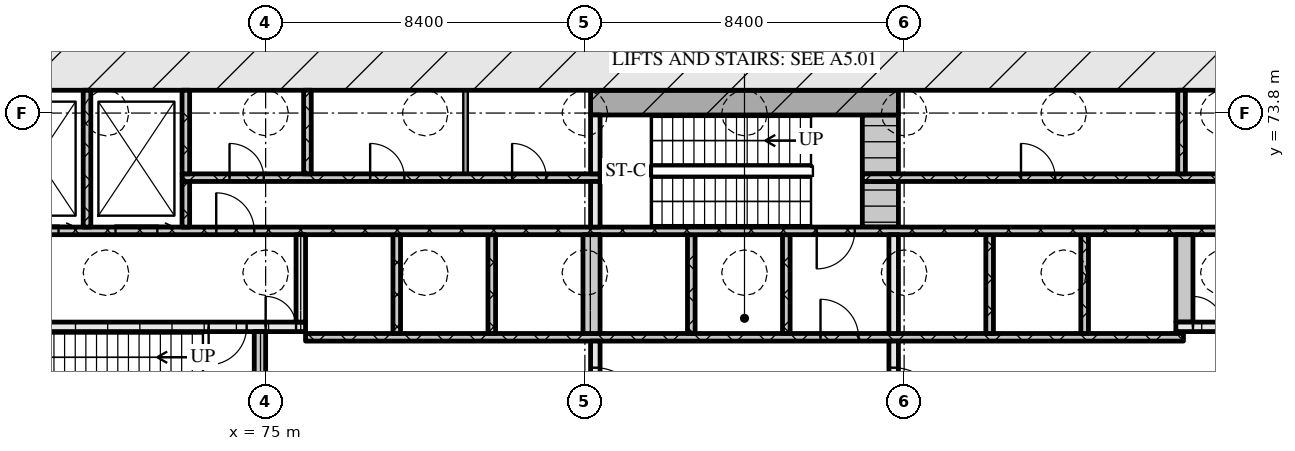
"""IFC4 building model, lengths in metres.
Left out: names, types, materials, properties, quantities, classifications, styles, units other than length and angle.
Written with IfcOpenShell. Run it as: python <this file> out.ifc"""

import sys

from ifc_helpers import new_model, si_unit, direction, frame, frame_2d, origin, place, context, subcontext, project, spatial, rectangle, extrude, element, fill, save


model = new_model("IFC4")
c1 = context("Model", 3, precision=1e-05, world=origin(), true_north=direction((0.0, 1.0)))
c2 = subcontext(c1, "Body", "Model", "MODEL_VIEW")
j1 = project(units=[si_unit("LENGTHUNIT", "METRE"), si_unit("PLANEANGLEUNIT", "RADIAN")], contexts=[c1])
p1 = place(None, origin())
s1 = spatial("IfcSite", under=j1, at=p1, CompositionType="ELEMENT")
p2 = place(p1, origin())
s2 = spatial("IfcBuilding", under=s1, at=p2, CompositionType="ELEMENT")
p3 = place(p2, frame((0.0, 0.0, -6.0)))
s3 = spatial("IfcBuildingStorey", under=s2, at=p3, CompositionType="ELEMENT", Elevation=-6.0)
p4 = place(p3, frame((66.6, 75.0, 0.0), z_axis=(0.0, 0.0, 1.0), x_axis=(1.0, 0.0, 0.0)))
e1 = element("IfcWall", 1, at=p4, inside=s3, PredefinedType="SOLIDWALL", context=c2, shape_type="SweptSolid", body=[
    extrude(rectangle(XDim=42.0, YDim=1.2, at=frame_2d((21.0, 0.0))), origin(), (0.0, 0.0, 1.0), 5.7),
])
p5 = place(p3, frame((74.85, 65.2, 0.0), z_axis=(0.0, 0.0, 1.0), x_axis=(0.0, 1.0, 0.0)))
e2 = element("IfcWall", 2, at=p5, inside=s3, PredefinedType="SOLIDWALL", context=c2, shape_type="SweptSolid", body=[
    extrude(rectangle(XDim=2.85, YDim=0.3, at=frame_2d((1.425, 0.0))), origin(), (0.0, 0.0, 1.0), 5.7),
])
p6 = place(p3, frame((83.675, 65.2, 0.0), z_axis=(0.0, 0.0, 1.0), x_axis=(0.0, 1.0, 0.0)))
e3 = element("IfcWall", 3, at=p6, inside=s3, PredefinedType="SOLIDWALL", context=c2, shape_type="SweptSolid", body=[
    extrude(rectangle(XDim=2.6, YDim=0.25, at=frame_2d((1.3, 0.0))), origin(), (0.0, 0.0, 1.0), 5.7),
])
p7 = place(p6, frame((0.7, 0.0, 0.0)))
e4 = element("IfcOpeningElement", 4, at=p7, cuts=e3, PredefinedType="OPENING", context=c2, shape_type="SweptSolid", body=[
    extrude(rectangle(XDim=1.2, YDim=2.1, at=frame_2d((0.6, 1.05))), frame((0.0, 0.135, 0.0), z_axis=(0.0, -1.0, 0.0), x_axis=(1.0, 0.0, 0.0)), (0.0, 0.0, 1.0), 0.27),
])
p8 = place(p3, frame((91.525, 65.2, 0.0), z_axis=(0.0, 0.0, 1.0), x_axis=(0.0, 1.0, 0.0)))
e5 = element("IfcWall", 5, at=p8, inside=s3, PredefinedType="SOLIDWALL", context=c2, shape_type="SweptSolid", body=[
    extrude(rectangle(XDim=2.6, YDim=0.25, at=frame_2d((1.3, 0.0))), origin(), (0.0, 0.0, 1.0), 5.7),
])
p9 = place(p8, frame((0.7, 0.0, 0.0)))
e6 = element("IfcOpeningElement", 6, at=p9, cuts=e5, PredefinedType="OPENING", context=c2, shape_type="SweptSolid", body=[
    extrude(rectangle(XDim=1.2, YDim=2.1, at=frame_2d((0.6, 1.05))), frame((0.0, 0.135, 0.0), z_axis=(0.0, -1.0, 0.0), x_axis=(1.0, 0.0, 0.0)), (0.0, 0.0, 1.0), 0.27),
])
p10 = place(p3, frame((76.05, 67.9, 0.0), z_axis=(0.0, 0.0, 1.0), x_axis=(1.0, 0.0, 0.0)))
e7 = element("IfcWall", 7, at=p10, inside=s3, PredefinedType="SOLIDWALL", context=c2, shape_type="SweptSolid", body=[
    extrude(rectangle(XDim=23.1, YDim=0.2, at=frame_2d((11.55, 0.0))), origin(), (0.0, 0.0, 1.0), 5.7),
])
p11 = place(p10, frame((13.55, 0.0, 0.0)))
e8 = element("IfcOpeningElement", 8, at=p11, cuts=e7, PredefinedType="OPENING", context=c2, shape_type="SweptSolid", body=[
    extrude(rectangle(XDim=1.0, YDim=2.1, at=frame_2d((0.5, 1.05))), frame((0.0, 0.11, 0.0), z_axis=(0.0, -1.0, 0.0), x_axis=(1.0, 0.0, 0.0)), (0.0, 0.0, 1.0), 0.22),
])
for number, where, z_axis, x_axis in (
    (9, (78.45, 68.0, 0.0), (0.0, 0.0, 1.0), (0.0, 1.0, 0.0)),
    (10, (80.95, 68.0, 0.0), (0.0, 0.0, 1.0), (0.0, 1.0, 0.0)),
):
    element("IfcWall", number, at=place(p3, frame(where, z_axis=z_axis, x_axis=x_axis)), inside=s3, PredefinedType="SOLIDWALL", context=c2, shape_type="SweptSolid", body=[
        extrude(rectangle(XDim=2.6, YDim=0.2, at=frame_2d((1.3, 0.0))), origin(), (0.0, 0.0, 1.0), 5.7),
    ])
p12 = place(p3, frame((83.575, 68.0, 0.0), z_axis=(0.0, 0.0, 1.0), x_axis=(0.0, 1.0, 0.0)))
e11 = element("IfcWall", 11, at=p12, inside=s3, PredefinedType="SOLIDWALL", context=c2, shape_type="SweptSolid", body=[
    extrude(rectangle(XDim=2.6, YDim=0.45, at=frame_2d((1.3, 0.0))), origin(), (0.0, 0.0, 1.0), 5.7),
])
for number, where, z_axis, x_axis in (
    (12, (86.2, 68.0, 0.0), (0.0, 0.0, 1.0), (0.0, 1.0, 0.0)),
    (13, (88.7, 68.0, 0.0), (0.0, 0.0, 1.0), (0.0, 1.0, 0.0)),
):
    element("IfcWall", number, at=place(p3, frame(where, z_axis=z_axis, x_axis=x_axis)), inside=s3, PredefinedType="SOLIDWALL", context=c2, shape_type="SweptSolid", body=[
        extrude(rectangle(XDim=2.6, YDim=0.2, at=frame_2d((1.3, 0.0))), origin(), (0.0, 0.0, 1.0), 5.7),
    ])
p13 = place(p3, frame((91.525, 68.0, 0.0), z_axis=(0.0, 0.0, 1.0), x_axis=(0.0, 1.0, 0.0)))
e14 = element("IfcWall", 14, at=p13, inside=s3, PredefinedType="SOLIDWALL", context=c2, shape_type="SweptSolid", body=[
    extrude(rectangle(XDim=2.6, YDim=0.25, at=frame_2d((1.3, 0.0))), origin(), (0.0, 0.0, 1.0), 5.7),
])
for number, where, z_axis, x_axis in (
    (15, (94.05, 68.0, 0.0), (0.0, 0.0, 1.0), (0.0, 1.0, 0.0)),
    (16, (96.55, 68.0, 0.0), (0.0, 0.0, 1.0), (0.0, 1.0, 0.0)),
):
    element("IfcWall", number, at=place(p3, frame(where, z_axis=z_axis, x_axis=x_axis)), inside=s3, PredefinedType="SOLIDWALL", context=c2, shape_type="SweptSolid", body=[
        extrude(rectangle(XDim=2.6, YDim=0.2, at=frame_2d((1.3, 0.0))), origin(), (0.0, 0.0, 1.0), 5.7),
    ])
p14 = place(p3, frame((98.95, 68.025, 0.0), z_axis=(0.0, 0.0, 1.0), x_axis=(1.0, 0.0, 0.0)))
e17 = element("IfcWall", 17, at=p14, inside=s3, PredefinedType="SOLIDWALL", context=c2, shape_type="SweptSolid", body=[
    extrude(rectangle(XDim=0.2, YDim=0.05, at=frame_2d((0.1, 0.0))), origin(), (0.0, 0.0, 1.0), 5.7),
])
p15 = place(p3, frame((67.8, 68.175, 0.0), z_axis=(0.0, 0.0, 1.0), x_axis=(1.0, 0.0, 0.0)))
e18 = element("IfcWall", 18, at=p15, inside=s3, PredefinedType="SOLIDWALL", context=c2, shape_type="SweptSolid", body=[
    extrude(rectangle(XDim=8.25, YDim=0.25, at=frame_2d((4.125, 0.0))), origin(), (0.0, 0.0, 1.0), 5.7),
])
p16 = place(p15, frame((5.7, 0.0, 0.0)))
e19 = element("IfcOpeningElement", 19, at=p16, cuts=e18, PredefinedType="OPENING", context=c2, shape_type="SweptSolid", body=[
    extrude(rectangle(XDim=1.0, YDim=2.1, at=frame_2d((0.5, 1.05))), frame((0.0, 0.135, 0.0), z_axis=(0.0, -1.0, 0.0), x_axis=(1.0, 0.0, 0.0)), (0.0, 0.0, 1.0), 0.27),
])
p17 = place(p15, frame((7.2, 0.0, 0.0)))
e20 = element("IfcOpeningElement", 20, at=p17, cuts=e18, PredefinedType="OPENING", context=c2, shape_type="SweptSolid", body=[
    extrude(rectangle(XDim=0.8, YDim=2.1, at=frame_2d((0.4, 1.05))), frame((0.0, 0.135, 0.0), z_axis=(0.0, -1.0, 0.0), x_axis=(1.0, 0.0, 0.0)), (0.0, 0.0, 1.0), 0.27),
])
p18 = place(p3, frame((98.95, 68.175, 0.0), z_axis=(0.0, 0.0, 1.0), x_axis=(1.0, 0.0, 0.0)))
e21 = element("IfcWall", 21, at=p18, inside=s3, PredefinedType="SOLIDWALL", context=c2, shape_type="SweptSolid", body=[
    extrude(rectangle(XDim=8.45, YDim=0.25, at=frame_2d((4.225, 0.0))), origin(), (0.0, 0.0, 1.0), 5.7),
])
p19 = place(p18, frame((0.45, 0.0, 0.0)))
e22 = element("IfcOpeningElement", 22, at=p19, cuts=e21, PredefinedType="OPENING", context=c2, shape_type="SweptSolid", body=[
    extrude(rectangle(XDim=0.8, YDim=2.1, at=frame_2d((0.4, 1.05))), frame((0.0, 0.135, 0.0), z_axis=(0.0, -1.0, 0.0), x_axis=(1.0, 0.0, 0.0)), (0.0, 0.0, 1.0), 0.27),
])
p20 = place(p18, frame((1.75, 0.0, 0.0)))
e23 = element("IfcOpeningElement", 23, at=p20, cuts=e21, PredefinedType="OPENING", context=c2, shape_type="SweptSolid", body=[
    extrude(rectangle(XDim=1.0, YDim=2.1, at=frame_2d((0.5, 1.05))), frame((0.0, 0.135, 0.0), z_axis=(0.0, -1.0, 0.0), x_axis=(1.0, 0.0, 0.0)), (0.0, 0.0, 1.0), 0.27),
])
p21 = place(p3, frame((75.925, 68.3, 0.0), z_axis=(0.0, 0.0, 1.0), x_axis=(0.0, 1.0, 0.0)))
e24 = element("IfcWall", 24, at=p21, inside=s3, PredefinedType="SOLIDWALL", context=c2, shape_type="SweptSolid", body=[
    extrude(rectangle(XDim=2.3, YDim=0.25, at=frame_2d((1.15, 0.0))), origin(), (0.0, 0.0, 1.0), 5.7),
])
p22 = place(p3, frame((99.175, 68.3, 0.0), z_axis=(0.0, 0.0, 1.0), x_axis=(0.0, 1.0, 0.0)))
e25 = element("IfcWall", 25, at=p22, inside=s3, PredefinedType="SOLIDWALL", context=c2, shape_type="SweptSolid", body=[
    extrude(rectangle(XDim=2.3, YDim=0.45, at=frame_2d((1.15, 0.0))), origin(), (0.0, 0.0, 1.0), 5.7),
])
p23 = place(p3, frame((67.8, 70.7, 0.0), z_axis=(0.0, 0.0, 1.0), x_axis=(1.0, 0.0, 0.0)))
e26 = element("IfcWall", 26, at=p23, inside=s3, PredefinedType="SOLIDWALL", context=c2, shape_type="SweptSolid", body=[
    extrude(rectangle(XDim=39.6, YDim=0.2, at=frame_2d((19.8, 0.0))), origin(), (0.0, 0.0, 1.0), 5.7),
])
p24 = place(p23, frame((0.65, 0.0, 0.0)))
e27 = element("IfcOpeningElement", 27, at=p24, cuts=e26, PredefinedType="OPENING", context=c2, shape_type="SweptSolid", body=[
    extrude(rectangle(XDim=1.1, YDim=2.1, at=frame_2d((0.55, 1.05))), frame((0.0, 0.11, 0.0), z_axis=(0.0, -1.0, 0.0), x_axis=(1.0, 0.0, 0.0)), (0.0, 0.0, 1.0), 0.22),
])
p25 = place(p23, frame((3.25, 0.0, 0.0)))
e28 = element("IfcOpeningElement", 28, at=p25, cuts=e26, PredefinedType="OPENING", context=c2, shape_type="SweptSolid", body=[
    extrude(rectangle(XDim=1.1, YDim=2.1, at=frame_2d((0.55, 1.05))), frame((0.0, 0.11, 0.0), z_axis=(0.0, -1.0, 0.0), x_axis=(1.0, 0.0, 0.0)), (0.0, 0.0, 1.0), 0.22),
])
p26 = place(p23, frame((5.9, 0.0, 0.0)))
e29 = element("IfcOpeningElement", 29, at=p26, cuts=e26, PredefinedType="OPENING", context=c2, shape_type="SweptSolid", body=[
    extrude(rectangle(XDim=1.0, YDim=2.1, at=frame_2d((0.5, 1.05))), frame((0.0, 0.11, 0.0), z_axis=(0.0, -1.0, 0.0), x_axis=(1.0, 0.0, 0.0)), (0.0, 0.0, 1.0), 0.22),
])
p27 = place(p23, frame((21.7, 0.0, 0.0)))
e30 = element("IfcOpeningElement", 30, at=p27, cuts=e26, PredefinedType="OPENING", context=c2, shape_type="SweptSolid", body=[
    extrude(rectangle(XDim=1.0, YDim=2.1, at=frame_2d((0.5, 1.05))), frame((0.0, 0.11, 0.0), z_axis=(0.0, -1.0, 0.0), x_axis=(1.0, 0.0, 0.0)), (0.0, 0.0, 1.0), 0.22),
])
p28 = place(p23, frame((32.7, 0.0, 0.0)))
e31 = element("IfcOpeningElement", 31, at=p28, cuts=e26, PredefinedType="OPENING", context=c2, shape_type="SweptSolid", body=[
    extrude(rectangle(XDim=1.0, YDim=2.1, at=frame_2d((0.5, 1.05))), frame((0.0, 0.11, 0.0), z_axis=(0.0, -1.0, 0.0), x_axis=(1.0, 0.0, 0.0)), (0.0, 0.0, 1.0), 0.22),
])
p29 = place(p23, frame((35.25, 0.0, 0.0)))
e32 = element("IfcOpeningElement", 32, at=p29, cuts=e26, PredefinedType="OPENING", context=c2, shape_type="SweptSolid", body=[
    extrude(rectangle(XDim=1.1, YDim=2.1, at=frame_2d((0.55, 1.05))), frame((0.0, 0.11, 0.0), z_axis=(0.0, -1.0, 0.0), x_axis=(1.0, 0.0, 0.0)), (0.0, 0.0, 1.0), 0.22),
])
p30 = place(p23, frame((37.85, 0.0, 0.0)))
e33 = element("IfcOpeningElement", 33, at=p30, cuts=e26, PredefinedType="OPENING", context=c2, shape_type="SweptSolid", body=[
    extrude(rectangle(XDim=1.1, YDim=2.1, at=frame_2d((0.55, 1.05))), frame((0.0, 0.11, 0.0), z_axis=(0.0, -1.0, 0.0), x_axis=(1.0, 0.0, 0.0)), (0.0, 0.0, 1.0), 0.22),
])
p31 = place(p3, frame((70.3, 70.8, 0.0), z_axis=(0.0, 0.0, 1.0), x_axis=(0.0, 1.0, 0.0)))
e34 = element("IfcWall", 34, at=p31, inside=s3, PredefinedType="SOLIDWALL", context=c2, shape_type="SweptSolid", body=[
    extrude(rectangle(XDim=3.6, YDim=0.2, at=frame_2d((1.8, 0.0))), origin(), (0.0, 0.0, 1.0), 5.7),
])
p32 = place(p3, frame((72.9, 70.8, 0.0), z_axis=(0.0, 0.0, 1.0), x_axis=(0.0, 1.0, 0.0)))
e35 = element("IfcWall", 35, at=p32, inside=s3, PredefinedType="SOLIDWALL", context=c2, shape_type="SweptSolid", body=[
    extrude(rectangle(XDim=1.2, YDim=0.2, at=frame_2d((0.6, 0.0))), origin(), (0.0, 0.0, 1.0), 5.7),
])
p33 = place(p3, frame((83.675, 70.8, 0.0), z_axis=(0.0, 0.0, 1.0), x_axis=(0.0, 1.0, 0.0)))
e36 = element("IfcWall", 36, at=p33, inside=s3, PredefinedType="SOLIDWALL", context=c2, shape_type="SweptSolid", body=[
    extrude(rectangle(XDim=1.2, YDim=0.25, at=frame_2d((0.6, 0.0))), origin(), (0.0, 0.0, 1.0), 5.7),
])
p34 = place(p3, frame((91.175, 70.8, 0.0), z_axis=(0.0, 0.0, 1.0), x_axis=(0.0, 1.0, 0.0)))
e37 = element("IfcWall", 37, at=p34, inside=s3, PredefinedType="SOLIDWALL", context=c2, shape_type="SweptSolid", body=[
    extrude(rectangle(XDim=1.2, YDim=0.95, at=frame_2d((0.6, 0.0))), origin(), (0.0, 0.0, 1.0), 5.7),
])
p35 = place(p3, frame((72.8, 72.1, 0.0), z_axis=(0.0, 0.0, 1.0), x_axis=(1.0, 0.0, 0.0)))
e38 = element("IfcWall", 38, at=p35, inside=s3, PredefinedType="SOLIDWALL", context=c2, shape_type="SweptSolid", body=[
    extrude(rectangle(XDim=11.0, YDim=0.2, at=frame_2d((5.5, 0.0))), origin(), (0.0, 0.0, 1.0), 5.7),
])
p36 = place(p35, frame((1.25, 0.0, 0.0)))
e39 = element("IfcOpeningElement", 39, at=p36, cuts=e38, PredefinedType="OPENING", context=c2, shape_type="SweptSolid", body=[
    extrude(rectangle(XDim=0.9, YDim=2.1, at=frame_2d((0.45, 1.05))), frame((0.0, 0.11, 0.0), z_axis=(0.0, -1.0, 0.0), x_axis=(1.0, 0.0, 0.0)), (0.0, 0.0, 1.0), 0.22),
])
p37 = place(p35, frame((4.95, 0.0, 0.0)))
e40 = element("IfcOpeningElement", 40, at=p37, cuts=e38, PredefinedType="OPENING", context=c2, shape_type="SweptSolid", body=[
    extrude(rectangle(XDim=0.9, YDim=2.1, at=frame_2d((0.45, 1.05))), frame((0.0, 0.11, 0.0), z_axis=(0.0, -1.0, 0.0), x_axis=(1.0, 0.0, 0.0)), (0.0, 0.0, 1.0), 0.22),
])
p38 = place(p35, frame((8.685, 0.0, 0.0)))
e41 = element("IfcOpeningElement", 41, at=p38, cuts=e38, PredefinedType="OPENING", context=c2, shape_type="SweptSolid", body=[
    extrude(rectangle(XDim=0.9, YDim=2.1, at=frame_2d((0.45, 1.05))), frame((0.0, 0.11, 0.0), z_axis=(0.0, -1.0, 0.0), x_axis=(1.0, 0.0, 0.0)), (0.0, 0.0, 1.0), 0.22),
])
p39 = place(p3, frame((90.7, 72.1, 0.0), z_axis=(0.0, 0.0, 1.0), x_axis=(1.0, 0.0, 0.0)))
e42 = element("IfcWall", 42, at=p39, inside=s3, PredefinedType="SOLIDWALL", context=c2, shape_type="SweptSolid", body=[
    extrude(rectangle(XDim=11.7, YDim=0.2, at=frame_2d((5.85, 0.0))), origin(), (0.0, 0.0, 1.0), 5.7),
])
p40 = place(p39, frame((4.175, 0.0, 0.0)))
e43 = element("IfcOpeningElement", 43, at=p40, cuts=e42, PredefinedType="OPENING", context=c2, shape_type="SweptSolid", body=[
    extrude(rectangle(XDim=0.9, YDim=2.1, at=frame_2d((0.45, 1.05))), frame((0.0, 0.11, 0.0), z_axis=(0.0, -1.0, 0.0), x_axis=(1.0, 0.0, 0.0)), (0.0, 0.0, 1.0), 0.22),
])
p41 = place(p39, frame((9.55, 0.0, 0.0)))
e44 = element("IfcOpeningElement", 44, at=p41, cuts=e42, PredefinedType="OPENING", context=c2, shape_type="SweptSolid", body=[
    extrude(rectangle(XDim=0.9, YDim=2.1, at=frame_2d((0.45, 1.05))), frame((0.0, 0.11, 0.0), z_axis=(0.0, -1.0, 0.0), x_axis=(1.0, 0.0, 0.0)), (0.0, 0.0, 1.0), 0.22),
])
for number, where, z_axis, x_axis in (
    (45, (72.9, 72.2, 0.0), (0.0, 0.0, 1.0), (0.0, 1.0, 0.0)),
    (46, (76.1, 72.2, 0.0), (0.0, 0.0, 1.0), (0.0, 1.0, 0.0)),
):
    element("IfcWall", number, at=place(p3, frame(where, z_axis=z_axis, x_axis=x_axis)), inside=s3, PredefinedType="SOLIDWALL", context=c2, shape_type="SweptSolid", body=[
        extrude(rectangle(XDim=2.2, YDim=0.2, at=frame_2d((1.1, 0.0))), origin(), (0.0, 0.0, 1.0), 5.7),
    ])
p42 = place(p3, frame((80.26, 72.2, 0.0), z_axis=(0.0, 0.0, 1.0), x_axis=(0.0, 1.0, 0.0)))
e47 = element("IfcWall", 47, at=p42, inside=s3, PredefinedType="PARTITIONING", context=c2, shape_type="SweptSolid", body=[
    extrude(rectangle(XDim=2.2, YDim=0.12, at=frame_2d((1.1, 0.0))), origin(), (0.0, 0.0, 1.0), 5.7),
])
p43 = place(p3, frame((83.675, 72.2, 0.0), z_axis=(0.0, 0.0, 1.0), x_axis=(0.0, 1.0, 0.0)))
e48 = element("IfcWall", 48, at=p43, inside=s3, PredefinedType="SOLIDWALL", context=c2, shape_type="SweptSolid", body=[
    extrude(rectangle(XDim=1.55, YDim=0.25, at=frame_2d((0.775, 0.0))), origin(), (0.0, 0.0, 1.0), 5.7),
])
p44 = place(p3, frame((91.175, 72.2, 0.0), z_axis=(0.0, 0.0, 1.0), x_axis=(0.0, 1.0, 0.0)))
e49 = element("IfcWall", 49, at=p44, inside=s3, PredefinedType="SOLIDWALL", context=c2, shape_type="SweptSolid", body=[
    extrude(rectangle(XDim=1.55, YDim=0.95, at=frame_2d((0.775, 0.0))), origin(), (0.0, 0.0, 1.0), 5.7),
])
p45 = place(p3, frame((99.1, 72.2, 0.0), z_axis=(0.0, 0.0, 1.0), x_axis=(0.0, 1.0, 0.0)))
e50 = element("IfcWall", 50, at=p45, inside=s3, PredefinedType="SOLIDWALL", context=c2, shape_type="SweptSolid", body=[
    extrude(rectangle(XDim=2.2, YDim=0.2, at=frame_2d((1.1, 0.0))), origin(), (0.0, 0.0, 1.0), 5.7),
])
p46 = place(p3, frame((83.55, 74.075, 0.0), z_axis=(0.0, 0.0, 1.0), x_axis=(1.0, 0.0, 0.0)))
e51 = element("IfcWall", 51, at=p46, inside=s3, PredefinedType="SOLIDWALL", context=c2, shape_type="SweptSolid", body=[
    extrude(rectangle(XDim=8.1, YDim=0.65, at=frame_2d((4.05, 0.0))), origin(), (0.0, 0.0, 1.0), 5.7),
])
p47 = place(p7, origin())
e52 = element("IfcDoor", 52, at=p47, inside=s3, OperationType="SINGLE_SWING_RIGHT", PredefinedType="DOOR", context=c2, shape_type="SweptSolid", body=[
    extrude(rectangle(XDim=1.2, YDim=2.1, at=frame_2d((0.6, 1.05))), frame((0.0, 0.025, 0.0), z_axis=(0.0, -1.0, 0.0), x_axis=(1.0, 0.0, 0.0)), (0.0, 0.0, 1.0), 0.05),
])
fill(e4, e52)
p48 = place(p9, origin())
e53 = element("IfcDoor", 53, at=p48, inside=s3, OperationType="SINGLE_SWING_RIGHT", PredefinedType="DOOR", context=c2, shape_type="SweptSolid", body=[
    extrude(rectangle(XDim=1.2, YDim=2.1, at=frame_2d((0.6, 1.05))), frame((0.0, 0.025, 0.0), z_axis=(0.0, -1.0, 0.0), x_axis=(1.0, 0.0, 0.0)), (0.0, 0.0, 1.0), 0.05),
])
fill(e6, e53)
p49 = place(p11, origin())
e54 = element("IfcDoor", 54, at=p49, inside=s3, OperationType="SINGLE_SWING_LEFT", PredefinedType="DOOR", context=c2, shape_type="SweptSolid", body=[
    extrude(rectangle(XDim=1.0, YDim=2.1, at=frame_2d((0.5, 1.05))), frame((0.0, 0.025, 0.0), z_axis=(0.0, -1.0, 0.0), x_axis=(1.0, 0.0, 0.0)), (0.0, 0.0, 1.0), 0.05),
])
fill(e8, e54)
p50 = place(p16, origin())
e55 = element("IfcDoor", 55, at=p50, inside=s3, OperationType="SINGLE_SWING_RIGHT", PredefinedType="DOOR", context=c2, shape_type="SweptSolid", body=[
    extrude(rectangle(XDim=1.0, YDim=2.1, at=frame_2d((0.5, 1.05))), frame((0.0, 0.025, 0.0), z_axis=(0.0, -1.0, 0.0), x_axis=(1.0, 0.0, 0.0)), (0.0, 0.0, 1.0), 0.05),
])
fill(e19, e55)
p51 = place(p17, origin())
e56 = element("IfcDoor", 56, at=p51, inside=s3, OperationType="SINGLE_SWING_LEFT", PredefinedType="DOOR", context=c2, shape_type="SweptSolid", body=[
    extrude(rectangle(XDim=0.8, YDim=2.1, at=frame_2d((0.4, 1.05))), frame((0.0, 0.025, 0.0), z_axis=(0.0, -1.0, 0.0), x_axis=(1.0, 0.0, 0.0)), (0.0, 0.0, 1.0), 0.05),
])
fill(e20, e56)
p52 = place(p19, origin())
e57 = element("IfcDoor", 57, at=p52, inside=s3, OperationType="SINGLE_SWING_LEFT", PredefinedType="DOOR", context=c2, shape_type="SweptSolid", body=[
    extrude(rectangle(XDim=0.8, YDim=2.1, at=frame_2d((0.4, 1.05))), frame((0.0, 0.025, 0.0), z_axis=(0.0, -1.0, 0.0), x_axis=(1.0, 0.0, 0.0)), (0.0, 0.0, 1.0), 0.05),
])
fill(e22, e57)
p53 = place(p24, origin())
e58 = element("IfcDoor", 58, at=p53, inside=s3, OperationType="SLIDING_TO_RIGHT", PredefinedType="DOOR", context=c2, shape_type="SweptSolid", body=[
    extrude(rectangle(XDim=1.1, YDim=2.1, at=frame_2d((0.55, 1.05))), frame((0.0, 0.025, 0.0), z_axis=(0.0, -1.0, 0.0), x_axis=(1.0, 0.0, 0.0)), (0.0, 0.0, 1.0), 0.05),
])
fill(e27, e58)
p54 = place(p25, origin())
e59 = element("IfcDoor", 59, at=p54, inside=s3, OperationType="SLIDING_TO_RIGHT", PredefinedType="DOOR", context=c2, shape_type="SweptSolid", body=[
    extrude(rectangle(XDim=1.1, YDim=2.1, at=frame_2d((0.55, 1.05))), frame((0.0, 0.025, 0.0), z_axis=(0.0, -1.0, 0.0), x_axis=(1.0, 0.0, 0.0)), (0.0, 0.0, 1.0), 0.05),
])
fill(e28, e59)
p55 = place(p26, origin())
e60 = element("IfcDoor", 60, at=p55, inside=s3, OperationType="SINGLE_SWING_LEFT", PredefinedType="DOOR", context=c2, shape_type="SweptSolid", body=[
    extrude(rectangle(XDim=1.0, YDim=2.1, at=frame_2d((0.5, 1.05))), frame((0.0, 0.025, 0.0), z_axis=(0.0, -1.0, 0.0), x_axis=(1.0, 0.0, 0.0)), (0.0, 0.0, 1.0), 0.05),
])
fill(e29, e60)
p56 = place(p27, origin())
e61 = element("IfcDoor", 61, at=p56, inside=s3, OperationType="SINGLE_SWING_RIGHT", PredefinedType="DOOR", context=c2, shape_type="SweptSolid", body=[
    extrude(rectangle(XDim=1.0, YDim=2.1, at=frame_2d((0.5, 1.05))), frame((0.0, 0.025, 0.0), z_axis=(0.0, -1.0, 0.0), x_axis=(1.0, 0.0, 0.0)), (0.0, 0.0, 1.0), 0.05),
])
fill(e30, e61)
p57 = place(p36, origin())
e62 = element("IfcDoor", 62, at=p57, inside=s3, OperationType="SINGLE_SWING_LEFT", PredefinedType="DOOR", context=c2, shape_type="SweptSolid", body=[
    extrude(rectangle(XDim=0.9, YDim=2.1, at=frame_2d((0.45, 1.05))), frame((0.0, 0.025, 0.0), z_axis=(0.0, -1.0, 0.0), x_axis=(1.0, 0.0, 0.0)), (0.0, 0.0, 1.0), 0.05),
])
fill(e39, e62)
p58 = place(p37, origin())
e63 = element("IfcDoor", 63, at=p58, inside=s3, OperationType="SINGLE_SWING_LEFT", PredefinedType="DOOR", context=c2, shape_type="SweptSolid", body=[
    extrude(rectangle(XDim=0.9, YDim=2.1, at=frame_2d((0.45, 1.05))), frame((0.0, 0.025, 0.0), z_axis=(0.0, -1.0, 0.0), x_axis=(1.0, 0.0, 0.0)), (0.0, 0.0, 1.0), 0.05),
])
fill(e40, e63)
p59 = place(p38, origin())
e64 = element("IfcDoor", 64, at=p59, inside=s3, OperationType="SINGLE_SWING_LEFT", PredefinedType="DOOR", context=c2, shape_type="SweptSolid", body=[
    extrude(rectangle(XDim=0.9, YDim=2.1, at=frame_2d((0.45, 1.05))), frame((0.0, 0.025, 0.0), z_axis=(0.0, -1.0, 0.0), x_axis=(1.0, 0.0, 0.0)), (0.0, 0.0, 1.0), 0.05),
])
fill(e41, e64)
p60 = place(p40, origin())
e65 = element("IfcDoor", 65, at=p60, inside=s3, OperationType="SINGLE_SWING_LEFT", PredefinedType="DOOR", context=c2, shape_type="SweptSolid", body=[
    extrude(rectangle(XDim=0.9, YDim=2.1, at=frame_2d((0.45, 1.05))), frame((0.0, 0.025, 0.0), z_axis=(0.0, -1.0, 0.0), x_axis=(1.0, 0.0, 0.0)), (0.0, 0.0, 1.0), 0.05),
])
fill(e43, e65)
save(model, sys.argv[1])
